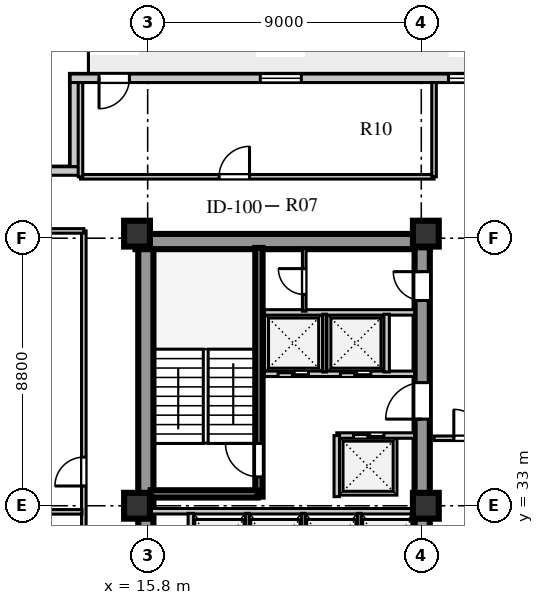
"""IFC4 building model, lengths in metres.
Left out: names, types, materials, properties, quantities, classifications, styles, units other than length and angle.
Written with IfcOpenShell. Run it as: python <this file> out.ifc"""

import sys

from ifc_helpers import new_model, si_unit, direction, frame, frame_2d, origin, origin_2d, place, context, subcontext, project, spatial, rectangle, extrude, element, fill, save


model = new_model("IFC4")
c1 = context("Model", 3, precision=1e-05, world=origin(), true_north=direction((0.0, 1.0)))
c2 = subcontext(c1, "Body", "Model", "MODEL_VIEW")
j1 = project(units=[si_unit("LENGTHUNIT", "METRE"), si_unit("PLANEANGLEUNIT", "RADIAN")], contexts=[c1])
p1 = place(None, origin())
s1 = spatial("IfcSite", under=j1, at=p1, CompositionType="ELEMENT")
p2 = place(p1, origin())
s2 = spatial("IfcBuilding", under=s1, at=p2, CompositionType="ELEMENT")
p3 = place(p2, frame((0.0, 0.0, 134.8)))
s3 = spatial("IfcBuildingStorey", under=s2, at=p3, CompositionType="ELEMENT", Elevation=134.8)
p4 = place(p3, frame((15.4, 41.69, 0.0), z_axis=(0.0, 0.0, 1.0), x_axis=(1.0, 0.0, 0.0)))
e1 = element("IfcWall", 1, at=p4, inside=s3, PredefinedType="SHEAR", context=c2, shape_type="SweptSolid", body=[
    extrude(rectangle(XDim=9.68, YDim=0.5, at=frame_2d((4.84, 0.0))), origin(), (0.0, 0.0, 1.0), 3.6),
])
p5 = place(p3, frame((15.74, 15.81, 0.0), z_axis=(0.0, 0.0, 1.0), x_axis=(0.0, 1.0, 0.0)))
e2 = element("IfcWall", 2, at=p5, inside=s3, PredefinedType="SHEAR", context=c2, shape_type="SweptSolid", body=[
    extrude(rectangle(XDim=25.63, YDim=0.5, at=frame_2d((12.815, 0.0))), origin(), (0.0, 0.0, 1.0), 3.6),
])
p6 = place(p3, frame((24.83, 15.74, 0.0), z_axis=(0.0, 0.0, 1.0), x_axis=(0.0, 1.0, 0.0)))
e3 = element("IfcWall", 3, at=p6, inside=s3, PredefinedType="SHEAR", context=c2, shape_type="SweptSolid", body=[
    extrude(rectangle(XDim=25.76, YDim=0.5, at=frame_2d((12.88, 0.0))), origin(), (0.0, 0.0, 1.0), 3.6),
])
p7 = place(p6, frame((1.61, 0.0, 0.0)))
e4 = element("IfcOpeningElement", 4, at=p7, cuts=e3, PredefinedType="OPENING", context=c2, shape_type="SweptSolid", body=[
    extrude(rectangle(XDim=1.2, YDim=2.1, at=frame_2d((0.6, 1.05))), frame((0.0, 0.26, 0.0), z_axis=(0.0, -1.0, 0.0), x_axis=(1.0, 0.0, 0.0)), (0.0, 0.0, 1.0), 0.52),
])
p8 = place(p6, frame((6.78, 0.0, 0.0)))
e5 = element("IfcOpeningElement", 5, at=p8, cuts=e3, PredefinedType="OPENING", context=c2, shape_type="SweptSolid", body=[
    extrude(rectangle(XDim=0.85, YDim=2.06, at=frame_2d((0.425, 1.03))), frame((0.0, 0.26, 0.0), z_axis=(0.0, -1.0, 0.0), x_axis=(1.0, 0.0, 0.0)), (0.0, 0.0, 1.0), 0.52),
])
p9 = place(p6, frame((12.11, 0.0, 0.0)))
e6 = element("IfcOpeningElement", 6, at=p9, cuts=e3, PredefinedType="OPENING", context=c2, shape_type="SweptSolid", body=[
    extrude(rectangle(XDim=1.5, YDim=2.12, at=frame_2d((0.75, 1.06))), frame((0.0, 0.26, 0.0), z_axis=(0.0, -1.0, 0.0), x_axis=(1.0, 0.0, 0.0)), (0.0, 0.0, 1.0), 0.52),
])
p10 = place(p6, frame((20.11, 0.0, 0.0)))
e7 = element("IfcOpeningElement", 7, at=p10, cuts=e3, PredefinedType="OPENING", context=c2, shape_type="SweptSolid", body=[
    extrude(rectangle(XDim=1.2, YDim=2.12, at=frame_2d((0.6, 1.06))), frame((0.0, 0.26, 0.0), z_axis=(0.0, -1.0, 0.0), x_axis=(1.0, 0.0, 0.0)), (0.0, 0.0, 1.0), 0.52),
])
p11 = place(p6, frame((24.01, 0.0, 0.0)))
e8 = element("IfcOpeningElement", 8, at=p11, cuts=e3, PredefinedType="OPENING", context=c2, shape_type="SweptSolid", body=[
    extrude(rectangle(XDim=0.95, YDim=2.1, at=frame_2d((0.475, 1.05))), frame((0.0, 0.26, 0.0), z_axis=(0.0, -1.0, 0.0), x_axis=(1.0, 0.0, 0.0)), (0.0, 0.0, 1.0), 0.52),
])
for number, where, z_axis, x_axis in (
    (9, (15.45, 33.0, 0.0), (0.0, 0.0, 1.0), (1.0, 0.0, 0.0)),
    (10, (15.45, 41.95, 0.0), (0.0, 0.0, 1.0), (1.0, 0.0, 0.0)),
    (11, (24.95, 33.0, 0.0), (0.0, 0.0, 1.0), (1.0, 0.0, 0.0)),
    (12, (24.95, 41.95, 0.0), (0.0, 0.0, 1.0), (1.0, 0.0, 0.0)),
):
    element("IfcColumn", number, at=place(p3, frame(where, z_axis=z_axis, x_axis=x_axis)), inside=s3, PredefinedType="COLUMN", context=c2, shape_type="SweptSolid", body=[
        extrude(rectangle(XDim=0.85, YDim=0.85, at=origin_2d()), origin(), (0.0, 0.0, 1.0), 3.6),
    ])
p12 = place(p3, frame((45.35, 47.06, 0.0), z_axis=(0.0, 0.0, 1.0), x_axis=(-1.0, 0.0, 0.0)))
e13 = element("IfcWall", 13, at=p12, inside=s3, PredefinedType="STANDARD", context=c2, shape_type="SweptSolid", body=[
    extrude(rectangle(XDim=32.1, YDim=0.28, at=frame_2d((16.05, 0.0))), origin(), (0.0, 0.0, 1.0), 3.6),
])
p13 = place(p12, frame((30.15, 0.0, 0.0)))
e14 = element("IfcOpeningElement", 14, at=p13, cuts=e13, PredefinedType="OPENING", context=c2, shape_type="SweptSolid", body=[
    extrude(rectangle(XDim=1.0, YDim=2.05, at=frame_2d((0.5, 1.025))), frame((0.0, 0.15, 0.0), z_axis=(0.0, -1.0, 0.0), x_axis=(1.0, 0.0, 0.0)), (0.0, 0.0, 1.0), 0.3),
])
p14 = place(p12, frame((24.495, 0.0, 0.8)))
e15 = element("IfcOpeningElement", 15, at=p14, cuts=e13, PredefinedType="OPENING", context=c2, shape_type="SweptSolid", body=[
    extrude(rectangle(XDim=1.35, YDim=1.9, at=frame_2d((0.675, 0.95))), frame((0.0, 0.15, 0.0), z_axis=(0.0, -1.0, 0.0), x_axis=(1.0, 0.0, 0.0)), (0.0, 0.0, 1.0), 0.3),
])
p15 = place(p12, frame((18.005, 0.0, 0.8)))
e16 = element("IfcOpeningElement", 16, at=p15, cuts=e13, PredefinedType="OPENING", context=c2, shape_type="SweptSolid", body=[
    extrude(rectangle(XDim=1.65, YDim=1.95, at=frame_2d((0.825, 0.975))), frame((0.0, 0.15, 0.0), z_axis=(0.0, -1.0, 0.0), x_axis=(1.0, 0.0, 0.0)), (0.0, 0.0, 1.0), 0.3),
])
p16 = place(p12, frame((15.865, 0.0, 0.8)))
e17 = element("IfcOpeningElement", 17, at=p16, cuts=e13, PredefinedType="OPENING", context=c2, shape_type="SweptSolid", body=[
    extrude(rectangle(XDim=1.2, YDim=1.75, at=frame_2d((0.6, 0.875))), frame((0.0, 0.15, 0.0), z_axis=(0.0, -1.0, 0.0), x_axis=(1.0, 0.0, 0.0)), (0.0, 0.0, 1.0), 0.3),
])
p17 = place(p12, frame((13.48, 0.0, 0.8)))
e18 = element("IfcOpeningElement", 18, at=p17, cuts=e13, PredefinedType="OPENING", context=c2, shape_type="SweptSolid", body=[
    extrude(rectangle(XDim=1.2, YDim=1.75, at=frame_2d((0.6, 0.875))), frame((0.0, 0.15, 0.0), z_axis=(0.0, -1.0, 0.0), x_axis=(1.0, 0.0, 0.0)), (0.0, 0.0, 1.0), 0.3),
])
p18 = place(p12, frame((11.095, 0.0, 0.8)))
e19 = element("IfcOpeningElement", 19, at=p18, cuts=e13, PredefinedType="OPENING", context=c2, shape_type="SweptSolid", body=[
    extrude(rectangle(XDim=1.2, YDim=1.75, at=frame_2d((0.6, 0.875))), frame((0.0, 0.15, 0.0), z_axis=(0.0, -1.0, 0.0), x_axis=(1.0, 0.0, 0.0)), (0.0, 0.0, 1.0), 0.3),
])
p19 = place(p12, frame((6.83, 0.0, 0.8)))
e20 = element("IfcOpeningElement", 20, at=p19, cuts=e13, PredefinedType="OPENING", context=c2, shape_type="SweptSolid", body=[
    extrude(rectangle(XDim=1.5, YDim=2.0, at=frame_2d((0.75, 1.0))), frame((0.0, 0.15, 0.0), z_axis=(0.0, -1.0, 0.0), x_axis=(1.0, 0.0, 0.0)), (0.0, 0.0, 1.0), 0.3),
])
p20 = place(p12, frame((1.72, 0.0, 0.8)))
e21 = element("IfcOpeningElement", 21, at=p20, cuts=e13, PredefinedType="OPENING", context=c2, shape_type="SweptSolid", body=[
    extrude(rectangle(XDim=1.2, YDim=1.75, at=frame_2d((0.6, 0.875))), frame((0.0, 0.15, 0.0), z_axis=(0.0, -1.0, 0.0), x_axis=(1.0, 0.0, 0.0)), (0.0, 0.0, 1.0), 0.3),
])
p21 = place(p3, frame((13.39, 46.92, 0.0), z_axis=(0.0, 0.0, 1.0), x_axis=(0.0, -1.0, 0.0)))
e22 = element("IfcWall", 22, at=p21, inside=s3, PredefinedType="STANDARD", context=c2, shape_type="SweptSolid", body=[
    extrude(rectangle(XDim=2.77, YDim=0.28, at=frame_2d((1.385, 0.0))), origin(), (0.0, 0.0, 1.0), 3.6),
])
p22 = place(p3, frame((13.53, 44.01, 0.0), z_axis=(0.0, 0.0, 1.0), x_axis=(-1.0, 0.0, 0.0)))
e23 = element("IfcWall", 23, at=p22, inside=s3, PredefinedType="STANDARD", context=c2, shape_type="SweptSolid", body=[
    extrude(rectangle(XDim=3.33, YDim=0.28, at=frame_2d((1.665, 0.0))), origin(), (0.0, 0.0, 1.0), 3.6),
])
p23 = place(p3, frame((15.9, 32.82, 0.0), z_axis=(0.0, 0.0, 1.0), x_axis=(1.0, 0.0, 0.0)))
e24 = element("IfcWall", 24, at=p23, inside=s3, PredefinedType="SOLIDWALL", context=c2, shape_type="SweptSolid", body=[
    extrude(rectangle(XDim=8.68, YDim=0.18, at=frame_2d((4.34, 0.0))), origin(), (0.0, 0.0, 1.0), 2.95),
])
p24 = place(p3, frame((17.22, 30.7, 0.0), z_axis=(0.0, 0.0, 1.0), x_axis=(0.0, 1.0, 0.0)))
e25 = element("IfcWall", 25, at=p24, inside=s3, PredefinedType="SOLIDWALL", context=c2, shape_type="SweptSolid", body=[
    extrude(rectangle(XDim=2.05, YDim=0.18, at=frame_2d((1.025, 0.0))), origin(), (0.0, 0.0, 1.0), 3.6),
])
for number, where, z_axis, x_axis in (
    (26, (19.08, 30.7, 0.0), (0.0, 0.0, 1.0), (0.0, 1.0, 0.0)),
    (27, (20.92, 30.7, 0.0), (0.0, 0.0, 1.0), (0.0, 1.0, 0.0)),
    (28, (22.76, 30.7, 0.0), (0.0, 0.0, 1.0), (0.0, 1.0, 0.0)),
):
    element("IfcWall", number, at=place(p3, frame(where, z_axis=z_axis, x_axis=x_axis)), inside=s3, PredefinedType="PARTITIONING", context=c2, shape_type="SweptSolid", body=[
        extrude(rectangle(XDim=2.05, YDim=0.12, at=frame_2d((1.025, 0.0))), origin(), (0.0, 0.0, 1.0), 3.6),
    ])
p25 = place(p3, frame((19.46, 33.3, 0.0), z_axis=(0.0, 0.0, 1.0), x_axis=(0.0, 1.0, 0.0)))
e29 = element("IfcWall", 29, at=p25, inside=s3, PredefinedType="SHEAR", context=c2, shape_type="SweptSolid", body=[
    extrude(rectangle(XDim=8.18, YDim=0.24, at=frame_2d((4.09, 0.0))), origin(), (0.0, 0.0, 1.0), 3.85),
])
p26 = place(p25, frame((0.65, 0.0, 0.0)))
e30 = element("IfcOpeningElement", 30, at=p26, cuts=e29, PredefinedType="OPENING", context=c2, shape_type="SweptSolid", body=[
    extrude(rectangle(XDim=1.1, YDim=2.1, at=frame_2d((0.55, 1.05))), frame((0.0, 0.13, 0.0), z_axis=(0.0, -1.0, 0.0), x_axis=(1.0, 0.0, 0.0)), (0.0, 0.0, 1.0), 0.26),
])
p27 = place(p3, frame((15.9, 33.39, 0.0), z_axis=(0.0, 0.0, 1.0), x_axis=(1.0, 0.0, 0.0)))
e31 = element("IfcWall", 31, at=p27, inside=s3, PredefinedType="SHEAR", context=c2, shape_type="SweptSolid", body=[
    extrude(rectangle(XDim=3.52, YDim=0.24, at=frame_2d((1.76, 0.0))), origin(), (0.0, 0.0, 1.0), 3.85),
])
p28 = place(p3, frame((22.02, 35.31, 0.0), z_axis=(0.0, 0.0, 1.0), x_axis=(1.0, 0.0, 0.0)))
e32 = element("IfcWall", 32, at=p28, inside=s3, PredefinedType="SOLIDWALL", context=c2, shape_type="SweptSolid", body=[
    extrude(rectangle(XDim=2.56, YDim=0.18, at=frame_2d((1.28, 0.0))), origin(), (0.0, 0.0, 1.0), 3.6),
])
p29 = place(p28, frame((0.55, 0.0, 0.0)))
e33 = element("IfcOpeningElement", 33, at=p29, cuts=e32, PredefinedType="OPENING", context=c2, shape_type="SweptSolid", body=[
    extrude(rectangle(XDim=1.0, YDim=2.1, at=frame_2d((0.5, 1.05))), frame((0.0, 0.1, 0.0), z_axis=(0.0, -1.0, 0.0), x_axis=(1.0, 0.0, 0.0)), (0.0, 0.0, 1.0), 0.2),
])
p30 = place(p3, frame((22.02, 33.3, 0.0), z_axis=(0.0, 0.0, 1.0), x_axis=(0.0, 1.0, 0.0)))
e34 = element("IfcWall", 34, at=p30, inside=s3, PredefinedType="SOLIDWALL", context=c2, shape_type="SweptSolid", body=[
    extrude(rectangle(XDim=2.01, YDim=0.18, at=frame_2d((1.005, 0.0))), origin(), (0.0, 0.0, 1.0), 3.6),
])
p31 = place(p3, frame((19.64, 37.34, 0.0), z_axis=(0.0, 0.0, 1.0), x_axis=(1.0, 0.0, 0.0)))
e35 = element("IfcWall", 35, at=p31, inside=s3, PredefinedType="SOLIDWALL", context=c2, shape_type="SweptSolid", body=[
    extrude(rectangle(XDim=4.94, YDim=0.18, at=frame_2d((2.47, 0.0))), origin(), (0.0, 0.0, 1.0), 3.6),
])
p32 = place(p31, frame((0.45, 0.0, 0.0)))
e36 = element("IfcOpeningElement", 36, at=p32, cuts=e35, PredefinedType="OPENING", context=c2, shape_type="SweptSolid", body=[
    extrude(rectangle(XDim=1.0, YDim=2.1, at=frame_2d((0.5, 1.05))), frame((0.0, 0.1, 0.0), z_axis=(0.0, -1.0, 0.0), x_axis=(1.0, 0.0, 0.0)), (0.0, 0.0, 1.0), 0.2),
])
p33 = place(p31, frame((2.5, 0.0, 0.0)))
e37 = element("IfcOpeningElement", 37, at=p33, cuts=e35, PredefinedType="OPENING", context=c2, shape_type="SweptSolid", body=[
    extrude(rectangle(XDim=1.0, YDim=2.1, at=frame_2d((0.5, 1.05))), frame((0.0, 0.1, 0.0), z_axis=(0.0, -1.0, 0.0), x_axis=(1.0, 0.0, 0.0)), (0.0, 0.0, 1.0), 0.2),
])
p34 = place(p3, frame((19.64, 39.36, 0.0), z_axis=(0.0, 0.0, 1.0), x_axis=(1.0, 0.0, 0.0)))
e38 = element("IfcWall", 38, at=p34, inside=s3, PredefinedType="SOLIDWALL", context=c2, shape_type="SweptSolid", body=[
    extrude(rectangle(XDim=4.94, YDim=0.18, at=frame_2d((2.47, 0.0))), origin(), (0.0, 0.0, 1.0), 3.6),
])
p35 = place(p3, frame((21.62, 37.4, 0.0), z_axis=(0.0, 0.0, 1.0), x_axis=(0.0, 1.0, 0.0)))
e39 = element("IfcWall", 39, at=p35, inside=s3, PredefinedType="PARTITIONING", context=c2, shape_type="SweptSolid", body=[
    extrude(rectangle(XDim=1.9, YDim=0.12, at=frame_2d((0.95, 0.0))), origin(), (0.0, 0.0, 1.0), 3.6),
])
p36 = place(p3, frame((23.66, 37.4, 0.0), z_axis=(0.0, 0.0, 1.0), x_axis=(0.0, 1.0, 0.0)))
e40 = element("IfcWall", 40, at=p36, inside=s3, PredefinedType="SOLIDWALL", context=c2, shape_type="SweptSolid", body=[
    extrude(rectangle(XDim=1.9, YDim=0.18, at=frame_2d((0.95, 0.0))), origin(), (0.0, 0.0, 1.0), 3.6),
])
p37 = place(p3, frame((20.95, 39.4, 0.0), z_axis=(0.0, 0.0, 1.0), x_axis=(0.0, 1.0, 0.0)))
e41 = element("IfcWall", 41, at=p37, inside=s3, PredefinedType="PARTITIONING", context=c2, shape_type="SweptSolid", body=[
    extrude(rectangle(XDim=2.08, YDim=0.12, at=frame_2d((1.04, 0.0))), origin(), (0.0, 0.0, 1.0), 3.6),
])
p38 = place(p37, frame((0.55, 0.0, 0.0)))
e42 = element("IfcOpeningElement", 42, at=p38, cuts=e41, PredefinedType="OPENING", context=c2, shape_type="SweptSolid", body=[
    extrude(rectangle(XDim=0.85, YDim=2.06, at=frame_2d((0.425, 1.03))), frame((0.0, 0.07, 0.0), z_axis=(0.0, -1.0, 0.0), x_axis=(1.0, 0.0, 0.0)), (0.0, 0.0, 1.0), 0.14),
])
p39 = place(p3, frame((25.22, 35.22, 0.0), z_axis=(0.0, 0.0, 1.0), x_axis=(1.0, 0.0, 0.0)))
e43 = element("IfcWall", 43, at=p39, inside=s3, PredefinedType="PARTITIONING", context=c2, shape_type="SweptSolid", body=[
    extrude(rectangle(XDim=9.5, YDim=0.15, at=frame_2d((4.75, 0.0))), origin(), (0.0, 0.0, 1.0), 3.6),
])
p40 = place(p39, frame((0.65, 0.0, 0.0)))
e44 = element("IfcOpeningElement", 44, at=p40, cuts=e43, PredefinedType="OPENING", context=c2, shape_type="SweptSolid", body=[
    extrude(rectangle(XDim=0.95, YDim=2.1, at=frame_2d((0.475, 1.05))), frame((0.0, 0.085, 0.0), z_axis=(0.0, -1.0, 0.0), x_axis=(1.0, 0.0, 0.0)), (0.0, 0.0, 1.0), 0.17),
])
p41 = place(p39, frame((5.2, 0.0, 0.0)))
e45 = element("IfcOpeningElement", 45, at=p41, cuts=e43, PredefinedType="OPENING", context=c2, shape_type="SweptSolid", body=[
    extrude(rectangle(XDim=0.95, YDim=2.1, at=frame_2d((0.475, 1.05))), frame((0.0, 0.085, 0.0), z_axis=(0.0, -1.0, 0.0), x_axis=(1.0, 0.0, 0.0)), (0.0, 0.0, 1.0), 0.17),
])
p42 = place(p3, frame((13.7, 15.16, 0.0), z_axis=(0.0, 0.0, 1.0), x_axis=(0.0, 1.0, 0.0)))
e46 = element("IfcWall", 46, at=p42, inside=s3, PredefinedType="PARTITIONING", context=c2, shape_type="SweptSolid", body=[
    extrude(rectangle(XDim=26.88, YDim=0.15, at=frame_2d((13.44, 0.0))), origin(), (0.0, 0.0, 1.0), 3.6),
])
p43 = place(p42, frame((0.91, 0.0, 0.0)))
e47 = element("IfcOpeningElement", 47, at=p43, cuts=e46, PredefinedType="OPENING", context=c2, shape_type="SweptSolid", body=[
    extrude(rectangle(XDim=0.95, YDim=2.1, at=frame_2d((0.475, 1.05))), frame((0.0, 0.085, 0.0), z_axis=(0.0, -1.0, 0.0), x_axis=(1.0, 0.0, 0.0)), (0.0, 0.0, 1.0), 0.17),
])
p44 = place(p42, frame((9.69, 0.0, 0.0)))
e48 = element("IfcOpeningElement", 48, at=p44, cuts=e46, PredefinedType="OPENING", context=c2, shape_type="SweptSolid", body=[
    extrude(rectangle(XDim=0.95, YDim=2.1, at=frame_2d((0.475, 1.05))), frame((0.0, 0.085, 0.0), z_axis=(0.0, -1.0, 0.0), x_axis=(1.0, 0.0, 0.0)), (0.0, 0.0, 1.0), 0.17),
])
p45 = place(p42, frame((18.49, 0.0, 0.0)))
e49 = element("IfcOpeningElement", 49, at=p45, cuts=e46, PredefinedType="OPENING", context=c2, shape_type="SweptSolid", body=[
    extrude(rectangle(XDim=0.95, YDim=2.1, at=frame_2d((0.475, 1.05))), frame((0.0, 0.085, 0.0), z_axis=(0.0, -1.0, 0.0), x_axis=(1.0, 0.0, 0.0)), (0.0, 0.0, 1.0), 0.17),
])
p46 = place(p3, frame((10.48, 42.04, 0.0), z_axis=(0.0, 0.0, 1.0), x_axis=(1.0, 0.0, 0.0)))
e50 = element("IfcWall", 50, at=p46, inside=s3, PredefinedType="PARTITIONING", context=c2, shape_type="SweptSolid", body=[
    extrude(rectangle(XDim=3.22, YDim=0.15, at=frame_2d((1.61, 0.0))), origin(), (0.0, 0.0, 1.0), 3.1),
])
p47 = place(p3, frame((13.59, 43.82, 0.0), z_axis=(0.0, 0.0, 1.0), x_axis=(1.0, 0.0, 0.0)))
e51 = element("IfcWall", 51, at=p47, inside=s3, PredefinedType="PARTITIONING", context=c2, shape_type="SweptSolid", body=[
    extrude(rectangle(XDim=11.63, YDim=0.15, at=frame_2d((5.815, 0.0))), origin(), (0.0, 0.0, 1.0), 3.6),
])
p48 = place(p47, frame((4.56, 0.0, 0.0)))
e52 = element("IfcOpeningElement", 52, at=p48, cuts=e51, PredefinedType="OPENING", context=c2, shape_type="SweptSolid", body=[
    extrude(rectangle(XDim=1.0, YDim=2.08, at=frame_2d((0.5, 1.04))), frame((0.0, 0.085, 0.0), z_axis=(0.0, -1.0, 0.0), x_axis=(1.0, 0.0, 0.0)), (0.0, 0.0, 1.0), 0.17),
])
p49 = place(p3, frame((13.59, 43.82, 0.0), z_axis=(0.0, 0.0, 1.0), x_axis=(0.0, 1.0, 0.0)))
e53 = element("IfcWall", 53, at=p49, inside=s3, PredefinedType="PARTITIONING", context=c2, shape_type="SweptSolid", body=[
    extrude(rectangle(XDim=3.1, YDim=0.15, at=frame_2d((1.55, 0.0))), origin(), (0.0, 0.0, 1.0), 3.6),
])
p50 = place(p3, frame((25.22, 43.82, 0.0), z_axis=(0.0, 0.0, 1.0), x_axis=(0.0, 1.0, 0.0)))
e54 = element("IfcWall", 54, at=p50, inside=s3, PredefinedType="PARTITIONING", context=c2, shape_type="SweptSolid", body=[
    extrude(rectangle(XDim=3.1, YDim=0.15, at=frame_2d((1.55, 0.0))), origin(), (0.0, 0.0, 1.0), 3.1),
])
p51 = place(p3, frame((10.48, 32.8, 0.0), z_axis=(0.0, 0.0, 1.0), x_axis=(1.0, 0.0, 0.0)))
e55 = element("IfcWall", 55, at=p51, inside=s3, PredefinedType="PARTITIONING", context=c2, shape_type="SweptSolid", body=[
    extrude(rectangle(XDim=3.16, YDim=0.15, at=frame_2d((1.58, 0.0))), origin(), (0.0, 0.0, 1.0), 3.1),
])
p52 = place(p13, frame((1.0, 0.0, 0.0), z_axis=(0.0, 0.0, 1.0), x_axis=(-1.0, 0.0, 0.0)))
e56 = element("IfcDoor", 56, at=p52, inside=s3, OperationType="SINGLE_SWING_LEFT", PredefinedType="DOOR", context=c2, shape_type="SweptSolid", body=[
    extrude(rectangle(XDim=1.0, YDim=2.05, at=frame_2d((0.5, 1.025))), frame((0.0, 0.025, 0.0), z_axis=(0.0, -1.0, 0.0), x_axis=(1.0, 0.0, 0.0)), (0.0, 0.0, 1.0), 0.05),
])
fill(e14, e56)
p53 = place(p14, origin())
e57 = element("IfcWindow", 57, at=p53, inside=s3, PartitioningType="SINGLE_PANEL", PredefinedType="WINDOW", context=c2, shape_type="SweptSolid", body=[
    extrude(rectangle(XDim=1.35, YDim=1.9, at=frame_2d((0.675, 0.95))), frame((0.0, 0.03, 0.0), z_axis=(0.0, -1.0, 0.0), x_axis=(1.0, 0.0, 0.0)), (0.0, 0.0, 1.0), 0.06),
])
fill(e15, e57)
p54 = place(p15, origin())
e58 = element("IfcWindow", 58, at=p54, inside=s3, PartitioningType="SINGLE_PANEL", PredefinedType="WINDOW", context=c2, shape_type="SweptSolid", body=[
    extrude(rectangle(XDim=1.65, YDim=1.95, at=frame_2d((0.825, 0.975))), frame((0.0, 0.03, 0.0), z_axis=(0.0, -1.0, 0.0), x_axis=(1.0, 0.0, 0.0)), (0.0, 0.0, 1.0), 0.06),
])
fill(e16, e58)
p55 = place(p26, origin())
e59 = element("IfcDoor", 59, at=p55, inside=s3, OperationType="SINGLE_SWING_RIGHT", PredefinedType="DOOR", context=c2, shape_type="SweptSolid", body=[
    extrude(rectangle(XDim=1.1, YDim=2.1, at=frame_2d((0.55, 1.05))), frame((0.0, 0.025, 0.0), z_axis=(0.0, -1.0, 0.0), x_axis=(1.0, 0.0, 0.0)), (0.0, 0.0, 1.0), 0.05),
])
fill(e30, e59)
p56 = place(p10, frame((1.2, 0.0, 0.0), z_axis=(0.0, 0.0, 1.0), x_axis=(-1.0, 0.0, 0.0)))
e60 = element("IfcDoor", 60, at=p56, inside=s3, OperationType="SINGLE_SWING_RIGHT", PredefinedType="DOOR", context=c2, shape_type="SweptSolid", body=[
    extrude(rectangle(XDim=1.2, YDim=2.12, at=frame_2d((0.6, 1.06))), frame((0.0, 0.025, 0.0), z_axis=(0.0, -1.0, 0.0), x_axis=(1.0, 0.0, 0.0)), (0.0, 0.0, 1.0), 0.05),
])
fill(e7, e60)
p57 = place(p32, frame((1.0, 0.0, 0.0), z_axis=(0.0, 0.0, 1.0), x_axis=(-1.0, 0.0, 0.0)))
e61 = element("IfcDoor", 61, at=p57, inside=s3, OperationType="DOUBLE_DOOR_SLIDING", PredefinedType="DOOR", context=c2, shape_type="SweptSolid", body=[
    extrude(rectangle(XDim=1.0, YDim=2.1, at=frame_2d((0.5, 1.05))), frame((0.0, 0.025, 0.0), z_axis=(0.0, -1.0, 0.0), x_axis=(1.0, 0.0, 0.0)), (0.0, 0.0, 1.0), 0.05),
])
fill(e36, e61)
p58 = place(p33, frame((1.0, 0.0, 0.0), z_axis=(0.0, 0.0, 1.0), x_axis=(-1.0, 0.0, 0.0)))
e62 = element("IfcDoor", 62, at=p58, inside=s3, OperationType="DOUBLE_DOOR_SLIDING", PredefinedType="DOOR", context=c2, shape_type="SweptSolid", body=[
    extrude(rectangle(XDim=1.0, YDim=2.1, at=frame_2d((0.5, 1.05))), frame((0.0, 0.025, 0.0), z_axis=(0.0, -1.0, 0.0), x_axis=(1.0, 0.0, 0.0)), (0.0, 0.0, 1.0), 0.05),
])
fill(e37, e62)
p59 = place(p29, origin())
e63 = element("IfcDoor", 63, at=p59, inside=s3, OperationType="DOUBLE_DOOR_SLIDING", PredefinedType="DOOR", context=c2, shape_type="SweptSolid", body=[
    extrude(rectangle(XDim=1.0, YDim=2.1, at=frame_2d((0.5, 1.05))), frame((0.0, 0.025, 0.0), z_axis=(0.0, -1.0, 0.0), x_axis=(1.0, 0.0, 0.0)), (0.0, 0.0, 1.0), 0.05),
])
fill(e33, e63)
p60 = place(p38, origin())
e64 = element("IfcDoor", 64, at=p60, inside=s3, OperationType="SINGLE_SWING_RIGHT", PredefinedType="DOOR", context=c2, shape_type="SweptSolid", body=[
    extrude(rectangle(XDim=0.85, YDim=2.06, at=frame_2d((0.425, 1.03))), frame((0.0, 0.025, 0.0), z_axis=(0.0, -1.0, 0.0), x_axis=(1.0, 0.0, 0.0)), (0.0, 0.0, 1.0), 0.05),
])
fill(e42, e64)
p61 = place(p11, frame((0.95, 0.0, 0.0), z_axis=(0.0, 0.0, 1.0), x_axis=(-1.0, 0.0, 0.0)))
e65 = element("IfcDoor", 65, at=p61, inside=s3, OperationType="SINGLE_SWING_LEFT", PredefinedType="DOOR", context=c2, shape_type="SweptSolid", body=[
    extrude(rectangle(XDim=0.95, YDim=2.1, at=frame_2d((0.475, 1.05))), frame((0.0, 0.025, 0.0), z_axis=(0.0, -1.0, 0.0), x_axis=(1.0, 0.0, 0.0)), (0.0, 0.0, 1.0), 0.05),
])
fill(e8, e65)
p62 = place(p48, origin())
e66 = element("IfcDoor", 66, at=p62, inside=s3, OperationType="SINGLE_SWING_RIGHT", PredefinedType="DOOR", context=c2, shape_type="SweptSolid", body=[
    extrude(rectangle(XDim=1.0, YDim=2.08, at=frame_2d((0.5, 1.04))), frame((0.0, 0.025, 0.0), z_axis=(0.0, -1.0, 0.0), x_axis=(1.0, 0.0, 0.0)), (0.0, 0.0, 1.0), 0.05),
])
fill(e52, e66)
p63 = place(p45, origin())
e67 = element("IfcDoor", 67, at=p63, inside=s3, OperationType="SINGLE_SWING_LEFT", PredefinedType="DOOR", context=c2, shape_type="SweptSolid", body=[
    extrude(rectangle(XDim=0.95, YDim=2.1, at=frame_2d((0.475, 1.05))), frame((0.0, 0.025, 0.0), z_axis=(0.0, -1.0, 0.0), x_axis=(1.0, 0.0, 0.0)), (0.0, 0.0, 1.0), 0.05),
])
fill(e49, e67)
p64 = place(p40, origin())
e68 = element("IfcDoor", 68, at=p64, inside=s3, OperationType="SINGLE_SWING_LEFT", PredefinedType="DOOR", context=c2, shape_type="SweptSolid", body=[
    extrude(rectangle(XDim=0.95, YDim=2.1, at=frame_2d((0.475, 1.05))), frame((0.0, 0.025, 0.0), z_axis=(0.0, -1.0, 0.0), x_axis=(1.0, 0.0, 0.0)), (0.0, 0.0, 1.0), 0.05),
])
fill(e44, e68)
save(model, sys.argv[1])
